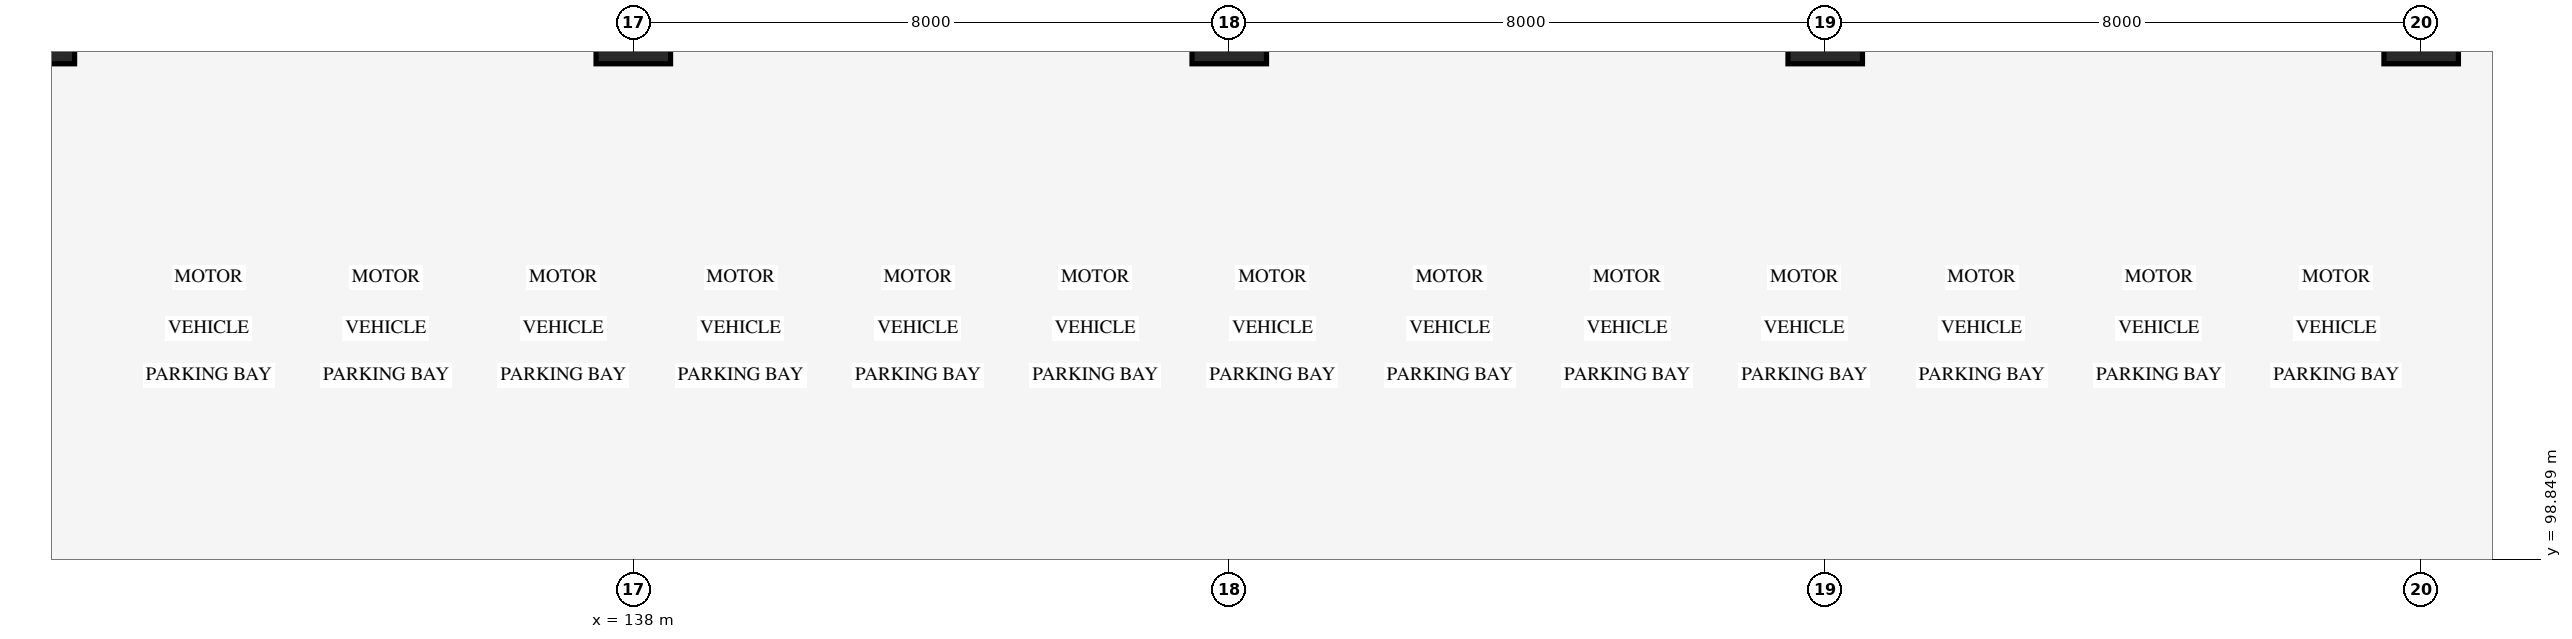
"""IFC4 building model, lengths in metres.
Left out: names, types, materials, properties, quantities, classifications, styles, units other than length and angle.
Written with IfcOpenShell. Run it as: python <this file> out.ifc"""

import sys

from ifc_helpers import new_model, si_unit, direction, frame, origin, origin_2d, place, context, subcontext, project, spatial, rectangle, extrude, element, save


model = new_model("IFC4")
c1 = context("Model", 3, precision=1e-05, world=origin(), true_north=direction((0.0, 1.0)))
c2 = subcontext(c1, "Body", "Model", "MODEL_VIEW")
j1 = project(units=[si_unit("LENGTHUNIT", "METRE"), si_unit("PLANEANGLEUNIT", "RADIAN")], contexts=[c1])
p1 = place(None, origin())
s1 = spatial("IfcSite", under=j1, at=p1, CompositionType="ELEMENT")
p2 = place(p1, origin())
s2 = spatial("IfcBuilding", under=s1, at=p2, CompositionType="ELEMENT")
p3 = place(p2, frame((0.0, 0.0, -4.5)))
s3 = spatial("IfcBuildingStorey", under=s2, at=p3, CompositionType="ELEMENT", Elevation=-4.5)
for number, where, z_axis, x_axis in (
    (1, (130.0, 106.0, 0.0), (0.0, 0.0, 1.0), (1.0, 0.0, 0.0)),
    (2, (138.0, 106.0, 0.0), (0.0, 0.0, 1.0), (1.0, 0.0, 0.0)),
    (3, (146.0, 106.0, 0.0), (0.0, 0.0, 1.0), (1.0, 0.0, 0.0)),
    (4, (154.0, 106.0, 0.0), (0.0, 0.0, 1.0), (1.0, 0.0, 0.0)),
    (5, (162.0, 106.0, 0.0), (0.0, 0.0, 1.0), (1.0, 0.0, 0.0)),
):
    element("IfcColumn", number, at=place(p3, frame(where, z_axis=z_axis, x_axis=x_axis)), inside=s3, PredefinedType="COLUMN", context=c2, shape_type="SweptSolid", body=[
        extrude(rectangle(XDim=1.0, YDim=1.0, at=origin_2d()), origin(), (0.0, 0.0, 1.0), 4.5),
    ])
save(model, sys.argv[1])
